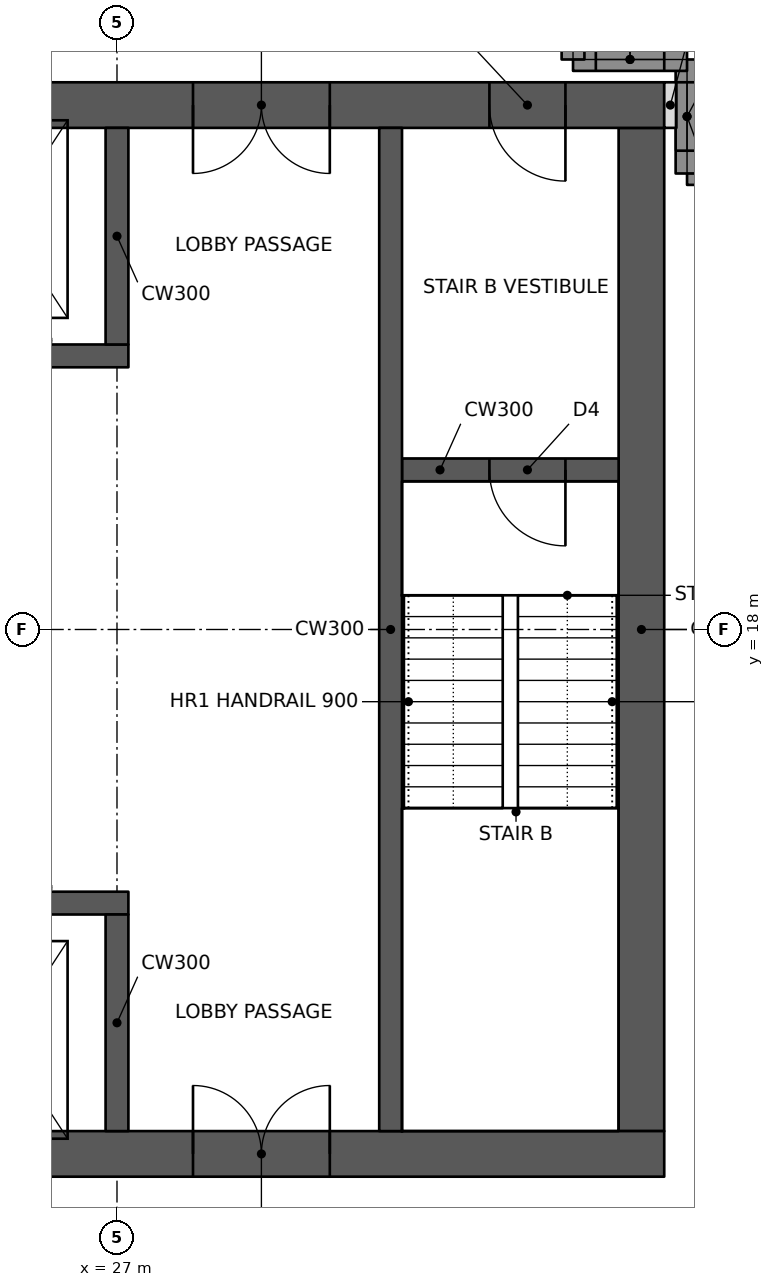
"""IFC4 building model, lengths in metres.
Left out: names, types, materials, properties, quantities, classifications, styles, units other than length and angle.
Written with IfcOpenShell. Run it as: python <this file> out.ifc"""

import sys

from ifc_helpers import new_model, si_unit, direction, frame, frame_2d, origin, place, context, subcontext, project, spatial, rectangle, extrude, element, fill, save


model = new_model("IFC4")
c1 = context("Model", 3, precision=1e-05, world=origin(), true_north=direction((0.0, 1.0)))
c2 = subcontext(c1, "Body", "Model", "MODEL_VIEW")
j1 = project(units=[si_unit("LENGTHUNIT", "METRE"), si_unit("PLANEANGLEUNIT", "RADIAN")], contexts=[c1])
p1 = place(None, origin())
s1 = spatial("IfcSite", under=j1, at=p1, CompositionType="ELEMENT")
p2 = place(p1, origin())
s2 = spatial("IfcBuilding", under=s1, at=p2, CompositionType="ELEMENT")
p3 = place(p2, frame((0.0, 0.0, 241.0)))
s3 = spatial("IfcBuildingStorey", under=s2, at=p3, CompositionType="ELEMENT", Elevation=241.0)
p4 = place(p3, frame((10.8, 11.1, 0.0), z_axis=(0.0, 0.0, 1.0), x_axis=(1.0, 0.0, 0.0)))
e1 = element("IfcWall", 1, at=p4, inside=s3, PredefinedType="SHEAR", context=c2, shape_type="SweptSolid", body=[
    extrude(rectangle(XDim=23.4, YDim=0.6, at=frame_2d((11.7, 0.0))), origin(), (0.0, 0.0, 1.0), 3.6),
])
p5 = place(p4, frame((1.0, 0.0, 0.0)))
e2 = element("IfcOpeningElement", 2, at=p5, cuts=e1, PredefinedType="OPENING", context=c2, shape_type="SweptSolid", body=[
    extrude(rectangle(XDim=1.0, YDim=2.1, at=frame_2d((0.5, 1.05))), frame((0.0, 0.31, 0.0), z_axis=(0.0, -1.0, 0.0), x_axis=(1.0, 0.0, 0.0)), (0.0, 0.0, 1.0), 0.62),
])
p6 = place(p4, frame((17.2, 0.0, 0.0)))
e3 = element("IfcOpeningElement", 3, at=p6, cuts=e1, PredefinedType="OPENING", context=c2, shape_type="SweptSolid", body=[
    extrude(rectangle(XDim=1.8, YDim=2.1, at=frame_2d((0.9, 1.05))), frame((0.0, 0.31, 0.0), z_axis=(0.0, -1.0, 0.0), x_axis=(1.0, 0.0, 0.0)), (0.0, 0.0, 1.0), 0.62),
])
p7 = place(p3, frame((10.8, 24.9, 0.0), z_axis=(0.0, 0.0, 1.0), x_axis=(1.0, 0.0, 0.0)))
e4 = element("IfcWall", 4, at=p7, inside=s3, PredefinedType="SHEAR", context=c2, shape_type="SweptSolid", body=[
    extrude(rectangle(XDim=23.4, YDim=0.6, at=frame_2d((11.7, 0.0))), origin(), (0.0, 0.0, 1.0), 3.6),
])
p8 = place(p7, frame((17.2, 0.0, 0.0)))
e5 = element("IfcOpeningElement", 5, at=p8, cuts=e4, PredefinedType="OPENING", context=c2, shape_type="SweptSolid", body=[
    extrude(rectangle(XDim=1.8, YDim=2.1, at=frame_2d((0.9, 1.05))), frame((0.0, 0.31, 0.0), z_axis=(0.0, -1.0, 0.0), x_axis=(1.0, 0.0, 0.0)), (0.0, 0.0, 1.0), 0.62),
])
p9 = place(p7, frame((21.1, 0.0, 0.0)))
e6 = element("IfcOpeningElement", 6, at=p9, cuts=e4, PredefinedType="OPENING", context=c2, shape_type="SweptSolid", body=[
    extrude(rectangle(XDim=1.0, YDim=2.1, at=frame_2d((0.5, 1.05))), frame((0.0, 0.31, 0.0), z_axis=(0.0, -1.0, 0.0), x_axis=(1.0, 0.0, 0.0)), (0.0, 0.0, 1.0), 0.62),
])
p10 = place(p7, frame((4.9, 0.0, 0.0)))
e7 = element("IfcOpeningElement", 7, at=p10, cuts=e4, PredefinedType="OPENING", context=c2, shape_type="SweptSolid", body=[
    extrude(rectangle(XDim=1.0, YDim=2.1, at=frame_2d((0.5, 1.05))), frame((0.0, 0.31, 0.0), z_axis=(0.0, -1.0, 0.0), x_axis=(1.0, 0.0, 0.0)), (0.0, 0.0, 1.0), 0.62),
])
p11 = place(p3, frame((33.9, 11.4, 0.0), z_axis=(0.0, 0.0, 1.0), x_axis=(0.0, 1.0, 0.0)))
e8 = element("IfcWall", 8, at=p11, inside=s3, PredefinedType="SHEAR", context=c2, shape_type="SweptSolid", body=[
    extrude(rectangle(XDim=13.2, YDim=0.6, at=frame_2d((6.6, 0.0))), origin(), (0.0, 0.0, 1.0), 3.6),
])
p12 = place(p3, frame((18.15, 14.4, 0.0), z_axis=(0.0, 0.0, 1.0), x_axis=(1.0, 0.0, 0.0)))
e9 = element("IfcWall", 9, at=p12, inside=s3, PredefinedType="SHEAR", context=c2, shape_type="SweptSolid", body=[
    extrude(rectangle(XDim=9.0, YDim=0.3, at=frame_2d((4.5, 0.0))), origin(), (0.0, 0.0, 1.0), 3.6),
])
p13 = place(p12, frame((0.8, 0.0, 0.0)))
e10 = element("IfcOpeningElement", 10, at=p13, cuts=e9, PredefinedType="OPENING", context=c2, shape_type="SweptSolid", body=[
    extrude(rectangle(XDim=1.1, YDim=2.1, at=frame_2d((0.55, 1.05))), frame((0.0, 0.16, 0.0), z_axis=(0.0, -1.0, 0.0), x_axis=(1.0, 0.0, 0.0)), (0.0, 0.0, 1.0), 0.32),
])
p14 = place(p12, frame((6.75, 0.0, 0.0)))
e11 = element("IfcOpeningElement", 11, at=p14, cuts=e9, PredefinedType="OPENING", context=c2, shape_type="SweptSolid", body=[
    extrude(rectangle(XDim=1.2, YDim=2.1, at=frame_2d((0.6, 1.05))), frame((0.0, 0.16, 0.0), z_axis=(0.0, -1.0, 0.0), x_axis=(1.0, 0.0, 0.0)), (0.0, 0.0, 1.0), 0.32),
])
p15 = place(p12, frame((3.8, 0.0, 0.0)))
e12 = element("IfcOpeningElement", 12, at=p15, cuts=e9, PredefinedType="OPENING", context=c2, shape_type="SweptSolid", body=[
    extrude(rectangle(XDim=1.1, YDim=2.1, at=frame_2d((0.55, 1.05))), frame((0.0, 0.16, 0.0), z_axis=(0.0, -1.0, 0.0), x_axis=(1.0, 0.0, 0.0)), (0.0, 0.0, 1.0), 0.32),
])
p16 = place(p3, frame((27.0, 11.4, 0.0), z_axis=(0.0, 0.0, 1.0), x_axis=(0.0, 1.0, 0.0)))
e13 = element("IfcWall", 13, at=p16, inside=s3, PredefinedType="SHEAR", context=c2, shape_type="SweptSolid", body=[
    extrude(rectangle(XDim=2.85, YDim=0.3, at=frame_2d((1.425, 0.0))), origin(), (0.0, 0.0, 1.0), 3.6),
])
p17 = place(p3, frame((18.15, 21.6, 0.0), z_axis=(0.0, 0.0, 1.0), x_axis=(1.0, 0.0, 0.0)))
e14 = element("IfcWall", 14, at=p17, inside=s3, PredefinedType="SHEAR", context=c2, shape_type="SweptSolid", body=[
    extrude(rectangle(XDim=9.0, YDim=0.3, at=frame_2d((4.5, 0.0))), origin(), (0.0, 0.0, 1.0), 3.6),
])
p18 = place(p17, frame((6.75, 0.0, 0.0)))
e15 = element("IfcOpeningElement", 15, at=p18, cuts=e14, PredefinedType="OPENING", context=c2, shape_type="SweptSolid", body=[
    extrude(rectangle(XDim=1.2, YDim=2.1, at=frame_2d((0.6, 1.05))), frame((0.0, 0.16, 0.0), z_axis=(0.0, -1.0, 0.0), x_axis=(1.0, 0.0, 0.0)), (0.0, 0.0, 1.0), 0.32),
])
p19 = place(p17, frame((0.8, 0.0, 0.0)))
e16 = element("IfcOpeningElement", 16, at=p19, cuts=e14, PredefinedType="OPENING", context=c2, shape_type="SweptSolid", body=[
    extrude(rectangle(XDim=1.1, YDim=2.1, at=frame_2d((0.55, 1.05))), frame((0.0, 0.16, 0.0), z_axis=(0.0, -1.0, 0.0), x_axis=(1.0, 0.0, 0.0)), (0.0, 0.0, 1.0), 0.32),
])
p20 = place(p17, frame((3.8, 0.0, 0.0)))
e17 = element("IfcOpeningElement", 17, at=p20, cuts=e14, PredefinedType="OPENING", context=c2, shape_type="SweptSolid", body=[
    extrude(rectangle(XDim=1.1, YDim=2.1, at=frame_2d((0.55, 1.05))), frame((0.0, 0.16, 0.0), z_axis=(0.0, -1.0, 0.0), x_axis=(1.0, 0.0, 0.0)), (0.0, 0.0, 1.0), 0.32),
])
p21 = place(p3, frame((27.0, 21.75, 0.0), z_axis=(0.0, 0.0, 1.0), x_axis=(0.0, 1.0, 0.0)))
e18 = element("IfcWall", 18, at=p21, inside=s3, PredefinedType="SHEAR", context=c2, shape_type="SweptSolid", body=[
    extrude(rectangle(XDim=2.85, YDim=0.3, at=frame_2d((1.425, 0.0))), origin(), (0.0, 0.0, 1.0), 3.6),
])
p22 = place(p3, frame((30.6, 11.4, 0.0), z_axis=(0.0, 0.0, 1.0), x_axis=(0.0, 1.0, 0.0)))
e19 = element("IfcWall", 19, at=p22, inside=s3, PredefinedType="SHEAR", context=c2, shape_type="SweptSolid", body=[
    extrude(rectangle(XDim=13.2, YDim=0.3, at=frame_2d((6.6, 0.0))), origin(), (0.0, 0.0, 1.0), 3.6),
])
p23 = place(p3, frame((30.75, 20.1, 0.0), z_axis=(0.0, 0.0, 1.0), x_axis=(1.0, 0.0, 0.0)))
e20 = element("IfcWall", 20, at=p23, inside=s3, PredefinedType="SHEAR", context=c2, shape_type="SweptSolid", body=[
    extrude(rectangle(XDim=2.85, YDim=0.3, at=frame_2d((1.425, 0.0))), origin(), (0.0, 0.0, 1.0), 3.6),
])
p24 = place(p23, frame((1.15, 0.0, 0.0)))
e21 = element("IfcOpeningElement", 21, at=p24, cuts=e20, PredefinedType="OPENING", context=c2, shape_type="SweptSolid", body=[
    extrude(rectangle(XDim=1.0, YDim=2.1, at=frame_2d((0.5, 1.05))), frame((0.0, 0.16, 0.0), z_axis=(0.0, -1.0, 0.0), x_axis=(1.0, 0.0, 0.0)), (0.0, 0.0, 1.0), 0.32),
])
p25 = place(p3, frame((36.0, 24.0, 0.0), z_axis=(0.0, 0.0, 1.0), x_axis=(-1.0, 0.0, 0.0)))
e22 = element("IfcWall", 22, at=p25, inside=s3, PredefinedType="SOLIDWALL", context=c2, shape_type="SweptSolid", body=[
    extrude(rectangle(XDim=1.5, YDim=0.3, at=frame_2d((0.75, 0.0))), origin(), (0.0, 0.0, 1.0), 2.62),
])
p26 = place(p3, frame((34.5, 24.0, 0.0), z_axis=(0.0, 0.0, 1.0), x_axis=(0.0, 1.0, 0.0)))
e23 = element("IfcWall", 23, at=p26, inside=s3, PredefinedType="SOLIDWALL", context=c2, shape_type="SweptSolid", body=[
    extrude(rectangle(XDim=1.5, YDim=0.3, at=frame_2d((0.75, 0.0))), origin(), (0.0, 0.0, 1.0), 3.4),
])
p27 = place(p26, frame((0.3, 0.0, 0.6)))
e24 = element("IfcOpeningElement", 24, at=p27, cuts=e23, PredefinedType="OPENING", context=c2, shape_type="SweptSolid", body=[
    extrude(rectangle(XDim=0.9, YDim=2.2, at=frame_2d((0.45, 1.1))), frame((0.0, 0.16, 0.0), z_axis=(0.0, -1.0, 0.0), x_axis=(1.0, 0.0, 0.0)), (0.0, 0.0, 1.0), 0.32),
])
p28 = place(p3, frame((34.5, 25.5, 0.0), z_axis=(0.0, 0.0, 1.0), x_axis=(-1.0, 0.0, 0.0)))
e25 = element("IfcWall", 25, at=p28, inside=s3, PredefinedType="SOLIDWALL", context=c2, shape_type="SweptSolid", body=[
    extrude(rectangle(XDim=1.5, YDim=0.3, at=frame_2d((0.75, 0.0))), origin(), (0.0, 0.0, 1.0), 3.4),
])
p29 = place(p28, frame((0.3, 0.0, 0.6)))
e26 = element("IfcOpeningElement", 26, at=p29, cuts=e25, PredefinedType="OPENING", context=c2, shape_type="SweptSolid", body=[
    extrude(rectangle(XDim=0.9, YDim=2.2, at=frame_2d((0.45, 1.1))), frame((0.0, 0.16, 0.0), z_axis=(0.0, -1.0, 0.0), x_axis=(1.0, 0.0, 0.0)), (0.0, 0.0, 1.0), 0.32),
])
p30 = place(p3, frame((33.0, 25.5, 0.0), z_axis=(0.0, 0.0, 1.0), x_axis=(0.0, 1.0, 0.0)))
e27 = element("IfcWall", 27, at=p30, inside=s3, PredefinedType="SOLIDWALL", context=c2, shape_type="SweptSolid", body=[
    extrude(rectangle(XDim=1.5, YDim=0.3, at=frame_2d((0.75, 0.0))), origin(), (0.0, 0.0, 1.0), 2.62),
])
p31 = place(p3, frame((34.2, 24.9, 0.0), z_axis=(0.0, 0.0, 1.0), x_axis=(1.0, 0.0, 0.0)))
e28 = element("IfcWall", 28, at=p31, inside=s3, PredefinedType="PARTITIONING", context=c2, shape_type="SweptSolid", body=[
    extrude(rectangle(XDim=0.16, YDim=0.6, at=frame_2d((0.08, 0.0))), origin(), (0.0, 0.0, 1.0), 3.4),
])
p32 = place(p27, origin())
e29 = element("IfcWindow", 29, at=p32, inside=s3, PartitioningType="SINGLE_PANEL", PredefinedType="WINDOW", context=c2, shape_type="SweptSolid", body=[
    extrude(rectangle(XDim=0.9, YDim=2.2, at=frame_2d((0.45, 1.1))), frame((0.0, 0.03, 0.0), z_axis=(0.0, -1.0, 0.0), x_axis=(1.0, 0.0, 0.0)), (0.0, 0.0, 1.0), 0.06),
])
fill(e24, e29)
p33 = place(p29, origin())
e30 = element("IfcWindow", 30, at=p33, inside=s3, PartitioningType="SINGLE_PANEL", PredefinedType="WINDOW", context=c2, shape_type="SweptSolid", body=[
    extrude(rectangle(XDim=0.9, YDim=2.2, at=frame_2d((0.45, 1.1))), frame((0.0, 0.03, 0.0), z_axis=(0.0, -1.0, 0.0), x_axis=(1.0, 0.0, 0.0)), (0.0, 0.0, 1.0), 0.06),
])
fill(e26, e30)
p34 = place(p6, origin())
e31 = element("IfcDoor", 31, at=p34, inside=s3, OperationType="DOUBLE_DOOR_SINGLE_SWING", PredefinedType="DOOR", context=c2, shape_type="SweptSolid", body=[
    extrude(rectangle(XDim=1.8, YDim=2.1, at=frame_2d((0.9, 1.05))), frame((0.0, 0.025, 0.0), z_axis=(0.0, -1.0, 0.0), x_axis=(1.0, 0.0, 0.0)), (0.0, 0.0, 1.0), 0.05),
])
fill(e3, e31)
p35 = place(p8, frame((1.8, 0.0, 0.0), z_axis=(0.0, 0.0, 1.0), x_axis=(-1.0, 0.0, 0.0)))
e32 = element("IfcDoor", 32, at=p35, inside=s3, OperationType="DOUBLE_DOOR_SINGLE_SWING", PredefinedType="DOOR", context=c2, shape_type="SweptSolid", body=[
    extrude(rectangle(XDim=1.8, YDim=2.1, at=frame_2d((0.9, 1.05))), frame((0.0, 0.025, 0.0), z_axis=(0.0, -1.0, 0.0), x_axis=(1.0, 0.0, 0.0)), (0.0, 0.0, 1.0), 0.05),
])
fill(e5, e32)
p36 = place(p9, frame((1.0, 0.0, 0.0), z_axis=(0.0, 0.0, 1.0), x_axis=(-1.0, 0.0, 0.0)))
e33 = element("IfcDoor", 33, at=p36, inside=s3, OperationType="SINGLE_SWING_LEFT", PredefinedType="DOOR", context=c2, shape_type="SweptSolid", body=[
    extrude(rectangle(XDim=1.0, YDim=2.1, at=frame_2d((0.5, 1.05))), frame((0.0, 0.025, 0.0), z_axis=(0.0, -1.0, 0.0), x_axis=(1.0, 0.0, 0.0)), (0.0, 0.0, 1.0), 0.05),
])
fill(e6, e33)
p37 = place(p24, frame((1.0, 0.0, 0.0), z_axis=(0.0, 0.0, 1.0), x_axis=(-1.0, 0.0, 0.0)))
e34 = element("IfcDoor", 34, at=p37, inside=s3, OperationType="SINGLE_SWING_LEFT", PredefinedType="DOOR", context=c2, shape_type="SweptSolid", body=[
    extrude(rectangle(XDim=1.0, YDim=2.1, at=frame_2d((0.5, 1.05))), frame((0.0, 0.025, 0.0), z_axis=(0.0, -1.0, 0.0), x_axis=(1.0, 0.0, 0.0)), (0.0, 0.0, 1.0), 0.05),
])
fill(e21, e34)
save(model, sys.argv[1])
